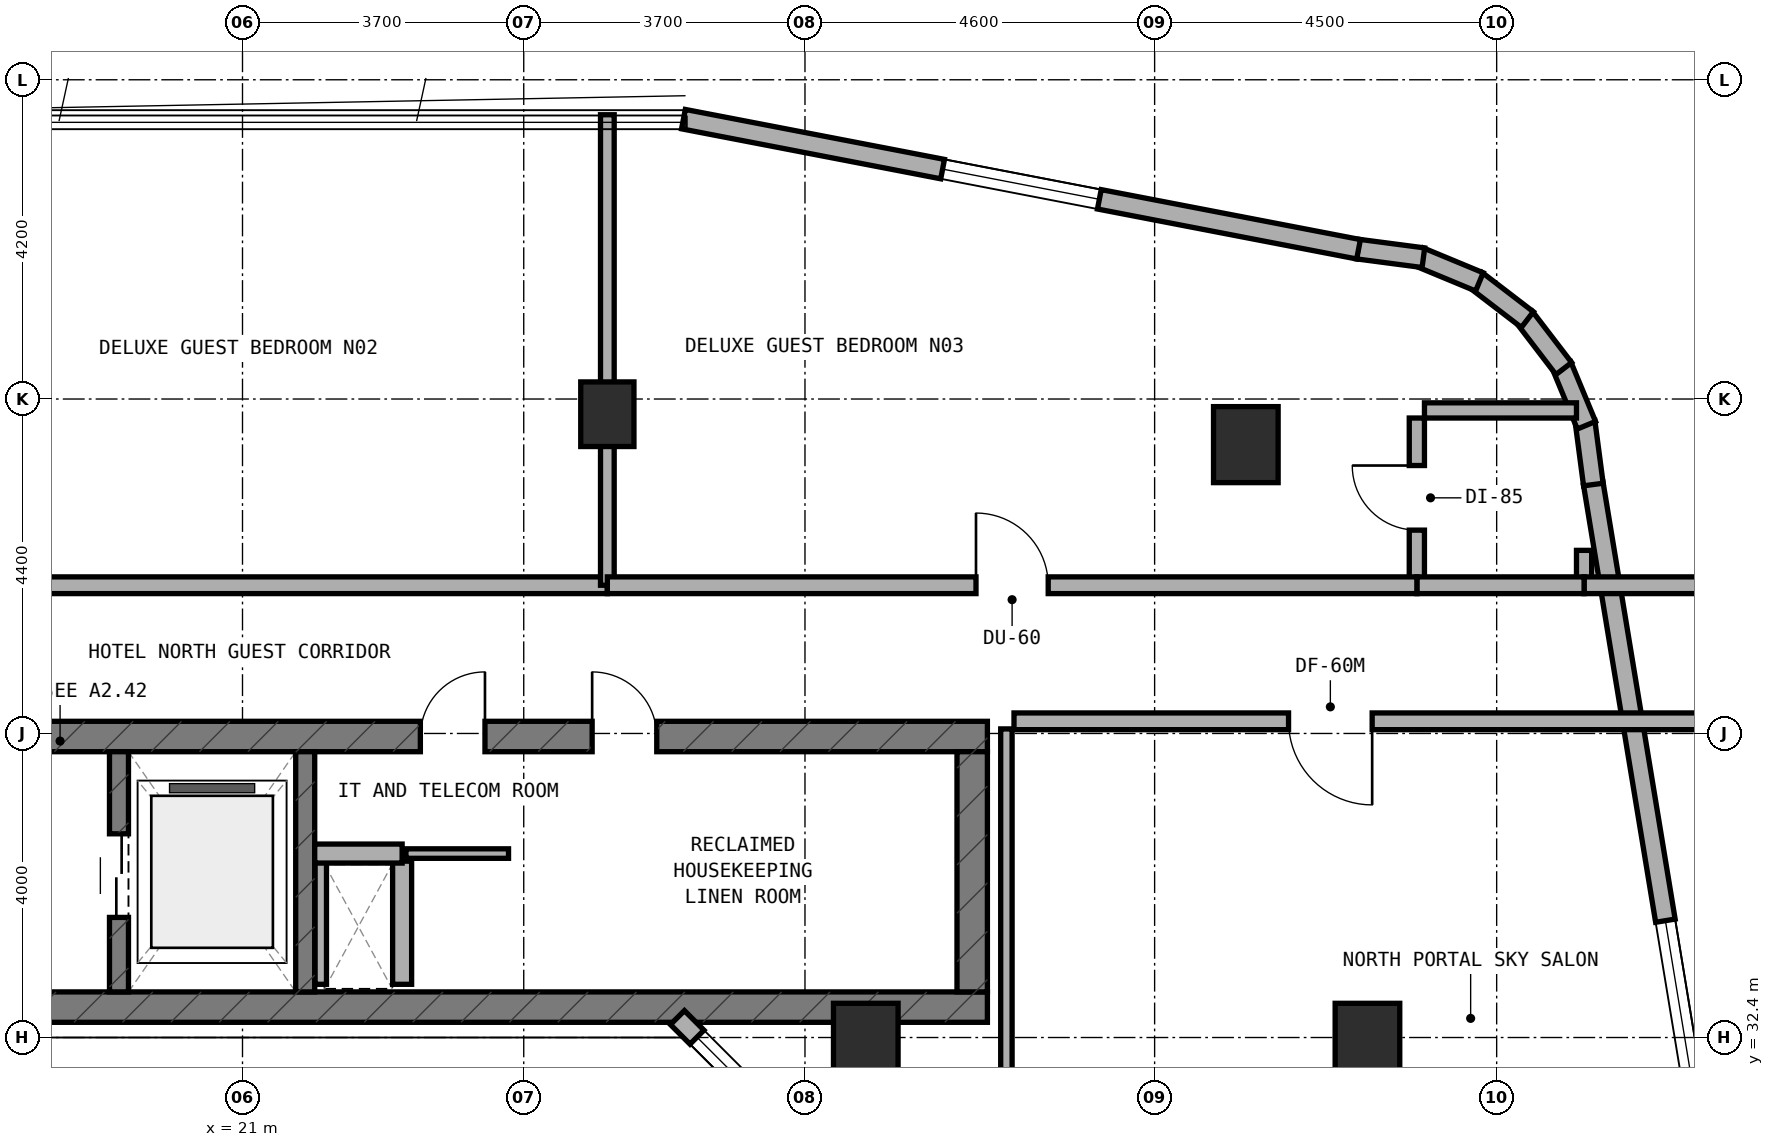
"""IFC4 building model, lengths in metres.
Left out: names, types, materials, properties, quantities, classifications, styles, units other than length and angle.
Written with IfcOpenShell. Run it as: python <this file> out.ifc"""

import sys

from ifc_helpers import new_model, si_unit, direction, frame, frame_2d, origin, origin_2d, place, context, subcontext, project, spatial, rectangle, extrude, element, fill, save


model = new_model("IFC4")
c1 = context("Model", 3, precision=1e-05, world=origin(), true_north=direction((0.0, 1.0)))
c2 = subcontext(c1, "Body", "Model", "MODEL_VIEW")
j1 = project(units=[si_unit("LENGTHUNIT", "METRE"), si_unit("PLANEANGLEUNIT", "RADIAN")], contexts=[c1])
p1 = place(None, origin())
s1 = spatial("IfcSite", under=j1, at=p1, CompositionType="ELEMENT")
p2 = place(p1, origin())
s2 = spatial("IfcBuilding", under=s1, at=p2, CompositionType="ELEMENT")
p3 = place(p2, frame((0.0, 0.0, 195.5)))
s3 = spatial("IfcBuildingStorey", under=s2, at=p3, CompositionType="ELEMENT", Elevation=195.5)
p4 = place(p3, frame((6.4, 32.8, 0.0), z_axis=(0.0, 0.0, 1.0), x_axis=(1.0, 0.0, 0.0)))
e1 = element("IfcWall", 1, at=p4, inside=s3, PredefinedType="SHEAR", context=c2, shape_type="SweptSolid", body=[
    extrude(rectangle(XDim=24.4, YDim=0.4, at=frame_2d((12.2, 0.0))), origin(), (0.0, 0.0, 1.0), 3.6),
])
p5 = place(p4, frame((6.05, 0.0, 0.0)))
e2 = element("IfcOpeningElement", 2, at=p5, cuts=e1, PredefinedType="OPENING", context=c2, shape_type="SweptSolid", body=[
    extrude(rectangle(XDim=1.1, YDim=2.15, at=frame_2d((0.55, 1.075))), frame((0.0, 0.21, 0.0), z_axis=(0.0, -1.0, 0.0), x_axis=(1.0, 0.0, 0.0)), (0.0, 0.0, 1.0), 0.42),
])
p6 = place(p3, frame((6.4, 36.36, 0.0), z_axis=(0.0, 0.0, 1.0), x_axis=(1.0, 0.0, 0.0)))
e3 = element("IfcWall", 3, at=p6, inside=s3, PredefinedType="SHEAR", context=c2, shape_type="SweptSolid", body=[
    extrude(rectangle(XDim=24.4, YDim=0.4, at=frame_2d((12.2, 0.0))), origin(), (0.0, 0.0, 1.0), 3.6),
])
p7 = place(p6, frame((9.15, 0.0, 0.0)))
e4 = element("IfcOpeningElement", 4, at=p7, cuts=e3, PredefinedType="OPENING", context=c2, shape_type="SweptSolid", body=[
    extrude(rectangle(XDim=1.2, YDim=2.15, at=frame_2d((0.6, 1.075))), frame((0.0, 0.21, 0.0), z_axis=(0.0, -1.0, 0.0), x_axis=(1.0, 0.0, 0.0)), (0.0, 0.0, 1.0), 0.42),
])
p8 = place(p6, frame((19.2, 0.0, 0.0)))
e5 = element("IfcOpeningElement", 5, at=p8, cuts=e3, PredefinedType="OPENING", context=c2, shape_type="SweptSolid", body=[
    extrude(rectangle(XDim=0.85, YDim=2.1, at=frame_2d((0.425, 1.05))), frame((0.0, 0.21, 0.0), z_axis=(0.0, -1.0, 0.0), x_axis=(1.0, 0.0, 0.0)), (0.0, 0.0, 1.0), 0.42),
])
p9 = place(p6, frame((16.94, 0.0, 0.0)))
e6 = element("IfcOpeningElement", 6, at=p9, cuts=e3, PredefinedType="OPENING", context=c2, shape_type="SweptSolid", body=[
    extrude(rectangle(XDim=0.85, YDim=2.1, at=frame_2d((0.425, 1.05))), frame((0.0, 0.21, 0.0), z_axis=(0.0, -1.0, 0.0), x_axis=(1.0, 0.0, 0.0)), (0.0, 0.0, 1.0), 0.42),
])
p10 = place(p3, frame((30.6, 33.0, 0.0), z_axis=(0.0, 0.0, 1.0), x_axis=(0.0, 1.0, 0.0)))
e7 = element("IfcWall", 7, at=p10, inside=s3, PredefinedType="SHEAR", context=c2, shape_type="SweptSolid", body=[
    extrude(rectangle(XDim=3.16, YDim=0.4, at=frame_2d((1.58, 0.0))), origin(), (0.0, 0.0, 1.0), 3.6),
])
p11 = place(p3, frame((19.375, 33.0, 0.0), z_axis=(0.0, 0.0, 1.0), x_axis=(0.0, 1.0, 0.0)))
e8 = element("IfcWall", 8, at=p11, inside=s3, PredefinedType="STANDARD", context=c2, shape_type="SweptSolid", body=[
    extrude(rectangle(XDim=3.16, YDim=0.25, at=frame_2d((1.58, 0.0))), origin(), (0.0, 0.0, 1.0), 3.28),
])
p12 = place(p11, frame((0.98, 0.0, 0.0)))
e9 = element("IfcOpeningElement", 9, at=p12, cuts=e8, PredefinedType="OPENING", context=c2, shape_type="SweptSolid", body=[
    extrude(rectangle(XDim=1.1, YDim=2.15, at=frame_2d((0.55, 1.075))), frame((0.0, 0.135, 0.0), z_axis=(0.0, -1.0, 0.0), x_axis=(1.0, 0.0, 0.0)), (0.0, 0.0, 1.0), 0.27),
])
p13 = place(p3, frame((21.825, 33.0, 0.0), z_axis=(0.0, 0.0, 1.0), x_axis=(0.0, 1.0, 0.0)))
e10 = element("IfcWall", 10, at=p13, inside=s3, PredefinedType="STANDARD", context=c2, shape_type="SweptSolid", body=[
    extrude(rectangle(XDim=3.16, YDim=0.25, at=frame_2d((1.58, 0.0))), origin(), (0.0, 0.0, 1.0), 3.28),
])
p14 = place(p3, frame((25.8, 40.6, 0.0), z_axis=(0.0, 0.0, 1.0), x_axis=(1.0, 0.0, 0.0)))
e11 = element("IfcColumn", 11, at=p14, inside=s3, PredefinedType="COLUMN", context=c2, shape_type="SweptSolid", body=[
    extrude(rectangle(XDim=0.7, YDim=0.85, at=origin_2d()), origin(), (0.0, 0.0, 1.0), 3.6),
])
for number, where, z_axis, x_axis in (
    (12, (34.2, 40.2, 0.0), (0.0, 0.0, 1.0), (1.0, 0.0, 0.0)),
    (13, (35.8, 32.35, 0.0), (0.0, 0.0, 1.0), (1.0, 0.0, 0.0)),
    (14, (29.2, 32.35, 0.0), (0.0, 0.0, 1.0), (1.0, 0.0, 0.0)),
):
    element("IfcColumn", number, at=place(p3, frame(where, z_axis=z_axis, x_axis=x_axis)), inside=s3, PredefinedType="COLUMN", context=c2, shape_type="SweptSolid", body=[
        extrude(rectangle(XDim=0.85, YDim=1.0, at=origin_2d()), origin(), (0.0, 0.0, 1.0), 3.6),
    ])
p15 = place(p3, frame((26.722, 32.662, 0.0), z_axis=(0.0, 0.0, 1.0), x_axis=(0.707106781187, -0.707106781187, 0.0)))
e15 = element("IfcWall", 15, at=p15, inside=s3, PredefinedType="STANDARD", context=c2, shape_type="SweptSolid", body=[
    extrude(rectangle(XDim=2.529, YDim=0.26, at=frame_2d((1.264, 0.0))), origin(), (0.0, 0.0, 1.0), 3.28),
])
p16 = place(p15, frame((0.364, 0.0, 0.85)))
e16 = element("IfcOpeningElement", 16, at=p16, cuts=e15, PredefinedType="OPENING", context=c2, shape_type="SweptSolid", body=[
    extrude(rectangle(XDim=1.8, YDim=1.5, at=frame_2d((0.9, 0.75))), frame((0.0, 0.14, 0.0), z_axis=(0.0, -1.0, 0.0), x_axis=(1.0, 0.0, 0.0)), (0.0, 0.0, 1.0), 0.28),
])
p17 = place(p3, frame((40.476, 29.354, 0.0), z_axis=(0.0, 0.0, 1.0), x_axis=(-0.162811037825, 0.986657268742, 0.0)))
e17 = element("IfcWall", 17, at=p17, inside=s3, PredefinedType="STANDARD", context=c2, shape_type="SweptSolid", body=[
    extrude(rectangle(XDim=10.473, YDim=0.26, at=frame_2d((5.236, 0.0))), origin(), (0.0, 0.0, 1.0), 3.28),
])
p18 = place(p17, frame((2.545, 0.0, 0.85)))
e18 = element("IfcOpeningElement", 18, at=p18, cuts=e17, PredefinedType="OPENING", context=c2, shape_type="SweptSolid", body=[
    extrude(rectangle(XDim=2.1, YDim=1.5, at=frame_2d((1.05, 0.75))), frame((0.0, 0.14, 0.0), z_axis=(0.0, -1.0, 0.0), x_axis=(1.0, 0.0, 0.0)), (0.0, 0.0, 1.0), 0.28),
])
p19 = place(p3, frame((38.772, 39.675, 0.0), z_axis=(0.0, 0.0, 1.0), x_axis=(-0.130704676564, 0.99142134712, 0.0)))
e19 = element("IfcWall", 19, at=p19, inside=s3, PredefinedType="STANDARD", context=c2, shape_type="SweptSolid", body=[
    extrude(rectangle(XDim=0.833, YDim=0.26, at=frame_2d((0.417, 0.0))), origin(), (0.0, 0.0, 1.0), 3.28),
])
p20 = place(p3, frame((38.681, 40.455, 0.0), z_axis=(0.0, 0.0, 1.0), x_axis=(-0.383086687796, 0.923712395518, 0.0)))
e20 = element("IfcWall", 20, at=p20, inside=s3, PredefinedType="STANDARD", context=c2, shape_type="SweptSolid", body=[
    extrude(rectangle(XDim=0.851, YDim=0.26, at=frame_2d((0.425, 0.0))), origin(), (0.0, 0.0, 1.0), 3.28),
])
for number, where, z_axis, x_axis in (
    (21, (38.383, 41.201, 0.0), (0.0, 0.0, 1.0), (-0.608, 0.794, 0.0)),
    (22, (37.904, 41.845, 0.0), (0.0, 0.0, 1.0), (-0.794, 0.608, 0.0)),
):
    element("IfcWall", number, at=place(p3, frame(where, z_axis=z_axis, x_axis=x_axis)), inside=s3, PredefinedType="STANDARD", context=c2, shape_type="SweptSolid", body=[
        extrude(rectangle(XDim=0.85, YDim=0.26, at=frame_2d((0.425, 0.0))), origin(), (0.0, 0.0, 1.0), 3.28),
    ])
p21 = place(p3, frame((37.273, 42.341, 0.0), z_axis=(0.0, 0.0, 1.0), x_axis=(-0.923712395518, 0.383086687796, 0.0)))
e23 = element("IfcWall", 23, at=p21, inside=s3, PredefinedType="STANDARD", context=c2, shape_type="SweptSolid", body=[
    extrude(rectangle(XDim=0.851, YDim=0.26, at=frame_2d((0.425, 0.0))), origin(), (0.0, 0.0, 1.0), 3.28),
])
p22 = place(p3, frame((36.536, 42.659, 0.0), z_axis=(0.0, 0.0, 1.0), x_axis=(-0.991488716273, 0.130192647656, 0.0)))
e24 = element("IfcWall", 24, at=p22, inside=s3, PredefinedType="STANDARD", context=c2, shape_type="SweptSolid", body=[
    extrude(rectangle(XDim=0.868, YDim=0.26, at=frame_2d((0.434, 0.0))), origin(), (0.0, 0.0, 1.0), 3.28),
])
p23 = place(p3, frame((35.683, 42.77, 0.0), z_axis=(0.0, 0.0, 1.0), x_axis=(-0.98192801022, 0.189254809039, 0.0)))
e25 = element("IfcWall", 25, at=p23, inside=s3, PredefinedType="STANDARD", context=c2, shape_type="SweptSolid", body=[
    extrude(rectangle(XDim=9.046, YDim=0.26, at=frame_2d((4.523, 0.0))), origin(), (0.0, 0.0, 1.0), 3.28),
])
p24 = place(p23, frame((3.473, 0.0, 0.85)))
e26 = element("IfcOpeningElement", 26, at=p24, cuts=e25, PredefinedType="OPENING", context=c2, shape_type="SweptSolid", body=[
    extrude(rectangle(XDim=2.1, YDim=1.5, at=frame_2d((1.05, 0.75))), frame((0.0, 0.14, 0.0), z_axis=(0.0, -1.0, 0.0), x_axis=(1.0, 0.0, 0.0)), (0.0, 0.0, 1.0), 0.28),
])
p25 = place(p3, frame((22.03, 33.1, 0.0), z_axis=(0.0, 0.0, 1.0), x_axis=(0.0, 1.0, 0.0)))
e27 = element("IfcWall", 27, at=p25, inside=s3, PredefinedType="PARTITIONING", context=c2, shape_type="SweptSolid", body=[
    extrude(rectangle(XDim=1.62, YDim=0.15, at=frame_2d((0.81, 0.0))), origin(), (0.0, 0.0, 1.0), 3.28),
])
p26 = place(p3, frame((23.1, 33.1, 0.0), z_axis=(0.0, 0.0, 1.0), x_axis=(0.0, 1.0, 0.0)))
e28 = element("IfcWall", 28, at=p26, inside=s3, PredefinedType="SOLIDWALL", context=c2, shape_type="SweptSolid", body=[
    extrude(rectangle(XDim=1.62, YDim=0.25, at=frame_2d((0.81, 0.0))), origin(), (0.0, 0.0, 1.0), 3.28),
])
p27 = place(p3, frame((21.95, 34.82, 0.0), z_axis=(0.0, 0.0, 1.0), x_axis=(1.0, 0.0, 0.0)))
e29 = element("IfcWall", 29, at=p27, inside=s3, PredefinedType="SOLIDWALL", context=c2, shape_type="SweptSolid", body=[
    extrude(rectangle(XDim=1.15, YDim=0.25, at=frame_2d((0.575, 0.0))), origin(), (0.0, 0.0, 1.0), 3.28),
])
p28 = place(p3, frame((23.15, 34.82, 0.0), z_axis=(0.0, 0.0, 1.0), x_axis=(1.0, 0.0, 0.0)))
e30 = element("IfcWall", 30, at=p28, inside=s3, PredefinedType="PARTITIONING", context=c2, shape_type="SweptSolid", body=[
    extrude(rectangle(XDim=1.35, YDim=0.125, at=frame_2d((0.675, 0.0))), origin(), (0.0, 0.0, 1.0), 3.28),
])
p29 = place(p3, frame((10.0, 38.35, 0.0), z_axis=(0.0, 0.0, 1.0), x_axis=(1.0, 0.0, 0.0)))
e31 = element("IfcWall", 31, at=p29, inside=s3, PredefinedType="SOLIDWALL", context=c2, shape_type="SweptSolid", body=[
    extrude(rectangle(XDim=15.8, YDim=0.22, at=frame_2d((7.9, 0.0))), origin(), (0.0, 0.0, 1.0), 2.955),
])
p30 = place(p29, frame((7.425, 0.0, 0.0)))
e32 = element("IfcOpeningElement", 32, at=p30, cuts=e31, PredefinedType="OPENING", context=c2, shape_type="SweptSolid", body=[
    extrude(rectangle(XDim=0.95, YDim=2.1, at=frame_2d((0.475, 1.05))), frame((0.0, 0.12, 0.0), z_axis=(0.0, -1.0, 0.0), x_axis=(1.0, 0.0, 0.0)), (0.0, 0.0, 1.0), 0.24),
])
p31 = place(p3, frame((25.8, 38.35, 0.0), z_axis=(0.0, 0.0, 1.0), x_axis=(0.0, 1.0, 0.0)))
e33 = element("IfcWall", 33, at=p31, inside=s3, PredefinedType="SOLIDWALL", context=c2, shape_type="SweptSolid", body=[
    extrude(rectangle(XDim=6.19, YDim=0.18, at=frame_2d((3.095, 0.0))), origin(), (0.0, 0.0, 1.0), 2.895),
])
p32 = place(p3, frame((36.45, 38.45, 0.0), z_axis=(0.0, 0.0, 1.0), x_axis=(0.0, 1.0, 0.0)))
e34 = element("IfcWall", 34, at=p32, inside=s3, PredefinedType="PLUMBINGWALL", context=c2, shape_type="SweptSolid", body=[
    extrude(rectangle(XDim=2.1, YDim=0.2, at=frame_2d((1.05, 0.0))), origin(), (0.0, 0.0, 1.0), 3.28),
])
p33 = place(p32, frame((0.625, 0.0, 0.0)))
e35 = element("IfcOpeningElement", 35, at=p33, cuts=e34, PredefinedType="OPENING", context=c2, shape_type="SweptSolid", body=[
    extrude(rectangle(XDim=0.85, YDim=2.1, at=frame_2d((0.425, 1.05))), frame((0.0, 0.11, 0.0), z_axis=(0.0, -1.0, 0.0), x_axis=(1.0, 0.0, 0.0)), (0.0, 0.0, 1.0), 0.22),
])
p34 = place(p3, frame((36.55, 40.65, 0.0), z_axis=(0.0, 0.0, 1.0), x_axis=(1.0, 0.0, 0.0)))
e36 = element("IfcWall", 36, at=p34, inside=s3, PredefinedType="PLUMBINGWALL", context=c2, shape_type="SweptSolid", body=[
    extrude(rectangle(XDim=2.0, YDim=0.2, at=frame_2d((1.0, 0.0))), origin(), (0.0, 0.0, 1.0), 3.28),
])
p35 = place(p3, frame((38.65, 38.35, 0.0), z_axis=(0.0, 0.0, 1.0), x_axis=(0.0, 1.0, 0.0)))
e37 = element("IfcWall", 37, at=p35, inside=s3, PredefinedType="PLUMBINGWALL", context=c2, shape_type="SweptSolid", body=[
    extrude(rectangle(XDim=0.459, YDim=0.2, at=frame_2d((0.229, 0.0))), origin(), (0.0, 0.0, 1.0), 3.28),
])
p36 = place(p3, frame((38.65, 38.35, 0.0), z_axis=(0.0, 0.0, 1.0), x_axis=(1.0, 0.0, 0.0)))
e38 = element("IfcWall", 38, at=p36, inside=s3, PredefinedType="SOLIDWALL", context=c2, shape_type="SweptSolid", body=[
    extrude(rectangle(XDim=1.79, YDim=0.22, at=frame_2d((0.895, 0.0))), origin(), (0.0, 0.0, 1.0), 3.28),
])
p37 = place(p3, frame((36.45, 38.35, 0.0), z_axis=(0.0, 0.0, 1.0), x_axis=(1.0, 0.0, 0.0)))
e39 = element("IfcWall", 39, at=p37, inside=s3, PredefinedType="SOLIDWALL", context=c2, shape_type="SweptSolid", body=[
    extrude(rectangle(XDim=2.2, YDim=0.22, at=frame_2d((1.1, 0.0))), origin(), (0.0, 0.0, 1.0), 3.28),
])
p38 = place(p3, frame((25.8, 38.35, 0.0), z_axis=(0.0, 0.0, 1.0), x_axis=(1.0, 0.0, 0.0)))
e40 = element("IfcWall", 40, at=p38, inside=s3, PredefinedType="SOLIDWALL", context=c2, shape_type="SweptSolid", body=[
    extrude(rectangle(XDim=10.65, YDim=0.22, at=frame_2d((5.325, 0.0))), origin(), (0.0, 0.0, 1.0), 2.895),
])
p39 = place(p38, frame((4.85, 0.0, 0.0)))
e41 = element("IfcOpeningElement", 41, at=p39, cuts=e40, PredefinedType="OPENING", context=c2, shape_type="SweptSolid", body=[
    extrude(rectangle(XDim=0.95, YDim=2.1, at=frame_2d((0.475, 1.05))), frame((0.0, 0.12, 0.0), z_axis=(0.0, -1.0, 0.0), x_axis=(1.0, 0.0, 0.0)), (0.0, 0.0, 1.0), 0.24),
])
p40 = place(p3, frame((31.05, 29.8, 0.0), z_axis=(0.0, 0.0, 1.0), x_axis=(0.0, 1.0, 0.0)))
e42 = element("IfcWall", 42, at=p40, inside=s3, PredefinedType="PARTITIONING", context=c2, shape_type="SweptSolid", body=[
    extrude(rectangle(XDim=6.66, YDim=0.15, at=frame_2d((3.33, 0.0))), origin(), (0.0, 0.0, 1.0), 2.955),
])
p41 = place(p3, frame((31.15, 36.56, 0.0), z_axis=(0.0, 0.0, 1.0), x_axis=(1.0, 0.0, 0.0)))
e43 = element("IfcWall", 43, at=p41, inside=s3, PredefinedType="SOLIDWALL", context=c2, shape_type="SweptSolid", body=[
    extrude(rectangle(XDim=9.15, YDim=0.22, at=frame_2d((4.575, 0.0))), origin(), (0.0, 0.0, 1.0), 2.895),
])
p42 = place(p41, frame((3.612, 0.0, 0.0)))
e44 = element("IfcOpeningElement", 44, at=p42, cuts=e43, PredefinedType="OPENING", context=c2, shape_type="SweptSolid", body=[
    extrude(rectangle(XDim=1.1, YDim=2.1, at=frame_2d((0.55, 1.05))), frame((0.0, 0.12, 0.0), z_axis=(0.0, -1.0, 0.0), x_axis=(1.0, 0.0, 0.0)), (0.0, 0.0, 1.0), 0.24),
])
p43 = place(p16, origin())
e45 = element("IfcWindow", 45, at=p43, inside=s3, PartitioningType="SINGLE_PANEL", PredefinedType="WINDOW", context=c2, shape_type="SweptSolid", body=[
    extrude(rectangle(XDim=1.8, YDim=1.5, at=frame_2d((0.9, 0.75))), frame((0.0, 0.03, 0.0), z_axis=(0.0, -1.0, 0.0), x_axis=(1.0, 0.0, 0.0)), (0.0, 0.0, 1.0), 0.06),
])
fill(e16, e45)
p44 = place(p18, origin())
e46 = element("IfcWindow", 46, at=p44, inside=s3, PartitioningType="SINGLE_PANEL", PredefinedType="WINDOW", context=c2, shape_type="SweptSolid", body=[
    extrude(rectangle(XDim=2.1, YDim=1.5, at=frame_2d((1.05, 0.75))), frame((0.0, 0.03, 0.0), z_axis=(0.0, -1.0, 0.0), x_axis=(1.0, 0.0, 0.0)), (0.0, 0.0, 1.0), 0.06),
])
fill(e18, e46)
p45 = place(p24, origin())
e47 = element("IfcWindow", 47, at=p45, inside=s3, PartitioningType="SINGLE_PANEL", PredefinedType="WINDOW", context=c2, shape_type="SweptSolid", body=[
    extrude(rectangle(XDim=2.1, YDim=1.5, at=frame_2d((1.05, 0.75))), frame((0.0, 0.03, 0.0), z_axis=(0.0, -1.0, 0.0), x_axis=(1.0, 0.0, 0.0)), (0.0, 0.0, 1.0), 0.06),
])
fill(e26, e47)
p46 = place(p12, origin())
e48 = element("IfcDoor", 48, at=p46, inside=s3, OperationType="DOUBLE_DOOR_SLIDING", PredefinedType="DOOR", context=c2, shape_type="SweptSolid", body=[
    extrude(rectangle(XDim=1.1, YDim=2.15, at=frame_2d((0.55, 1.075))), frame((0.0, 0.025, 0.0), z_axis=(0.0, -1.0, 0.0), x_axis=(1.0, 0.0, 0.0)), (0.0, 0.0, 1.0), 0.05),
])
fill(e9, e48)
p47 = place(p8, origin())
e49 = element("IfcDoor", 49, at=p47, inside=s3, OperationType="SINGLE_SWING_LEFT", PredefinedType="DOOR", context=c2, shape_type="SweptSolid", body=[
    extrude(rectangle(XDim=0.85, YDim=2.1, at=frame_2d((0.425, 1.05))), frame((0.0, 0.025, 0.0), z_axis=(0.0, -1.0, 0.0), x_axis=(1.0, 0.0, 0.0)), (0.0, 0.0, 1.0), 0.05),
])
fill(e5, e49)
p48 = place(p9, origin())
e50 = element("IfcDoor", 50, at=p48, inside=s3, OperationType="SINGLE_SWING_RIGHT", PredefinedType="DOOR", context=c2, shape_type="SweptSolid", body=[
    extrude(rectangle(XDim=0.85, YDim=2.1, at=frame_2d((0.425, 1.05))), frame((0.0, 0.025, 0.0), z_axis=(0.0, -1.0, 0.0), x_axis=(1.0, 0.0, 0.0)), (0.0, 0.0, 1.0), 0.05),
])
fill(e6, e50)
p49 = place(p33, origin())
e51 = element("IfcDoor", 51, at=p49, inside=s3, OperationType="SINGLE_SWING_RIGHT", PredefinedType="DOOR", context=c2, shape_type="SweptSolid", body=[
    extrude(rectangle(XDim=0.85, YDim=2.1, at=frame_2d((0.425, 1.05))), frame((0.0, 0.025, 0.0), z_axis=(0.0, -1.0, 0.0), x_axis=(1.0, 0.0, 0.0)), (0.0, 0.0, 1.0), 0.05),
])
fill(e35, e51)
p50 = place(p39, origin())
e52 = element("IfcDoor", 52, at=p50, inside=s3, OperationType="SINGLE_SWING_LEFT", PredefinedType="DOOR", context=c2, shape_type="SweptSolid", body=[
    extrude(rectangle(XDim=0.95, YDim=2.1, at=frame_2d((0.475, 1.05))), frame((0.0, 0.025, 0.0), z_axis=(0.0, -1.0, 0.0), x_axis=(1.0, 0.0, 0.0)), (0.0, 0.0, 1.0), 0.05),
])
fill(e41, e52)
p51 = place(p42, frame((1.1, 0.0, 0.0), z_axis=(0.0, 0.0, 1.0), x_axis=(-1.0, 0.0, 0.0)))
e53 = element("IfcDoor", 53, at=p51, inside=s3, OperationType="SINGLE_SWING_LEFT", PredefinedType="DOOR", context=c2, shape_type="SweptSolid", body=[
    extrude(rectangle(XDim=1.1, YDim=2.1, at=frame_2d((0.55, 1.05))), frame((0.0, 0.025, 0.0), z_axis=(0.0, -1.0, 0.0), x_axis=(1.0, 0.0, 0.0)), (0.0, 0.0, 1.0), 0.05),
])
fill(e44, e53)
save(model, sys.argv[1])
